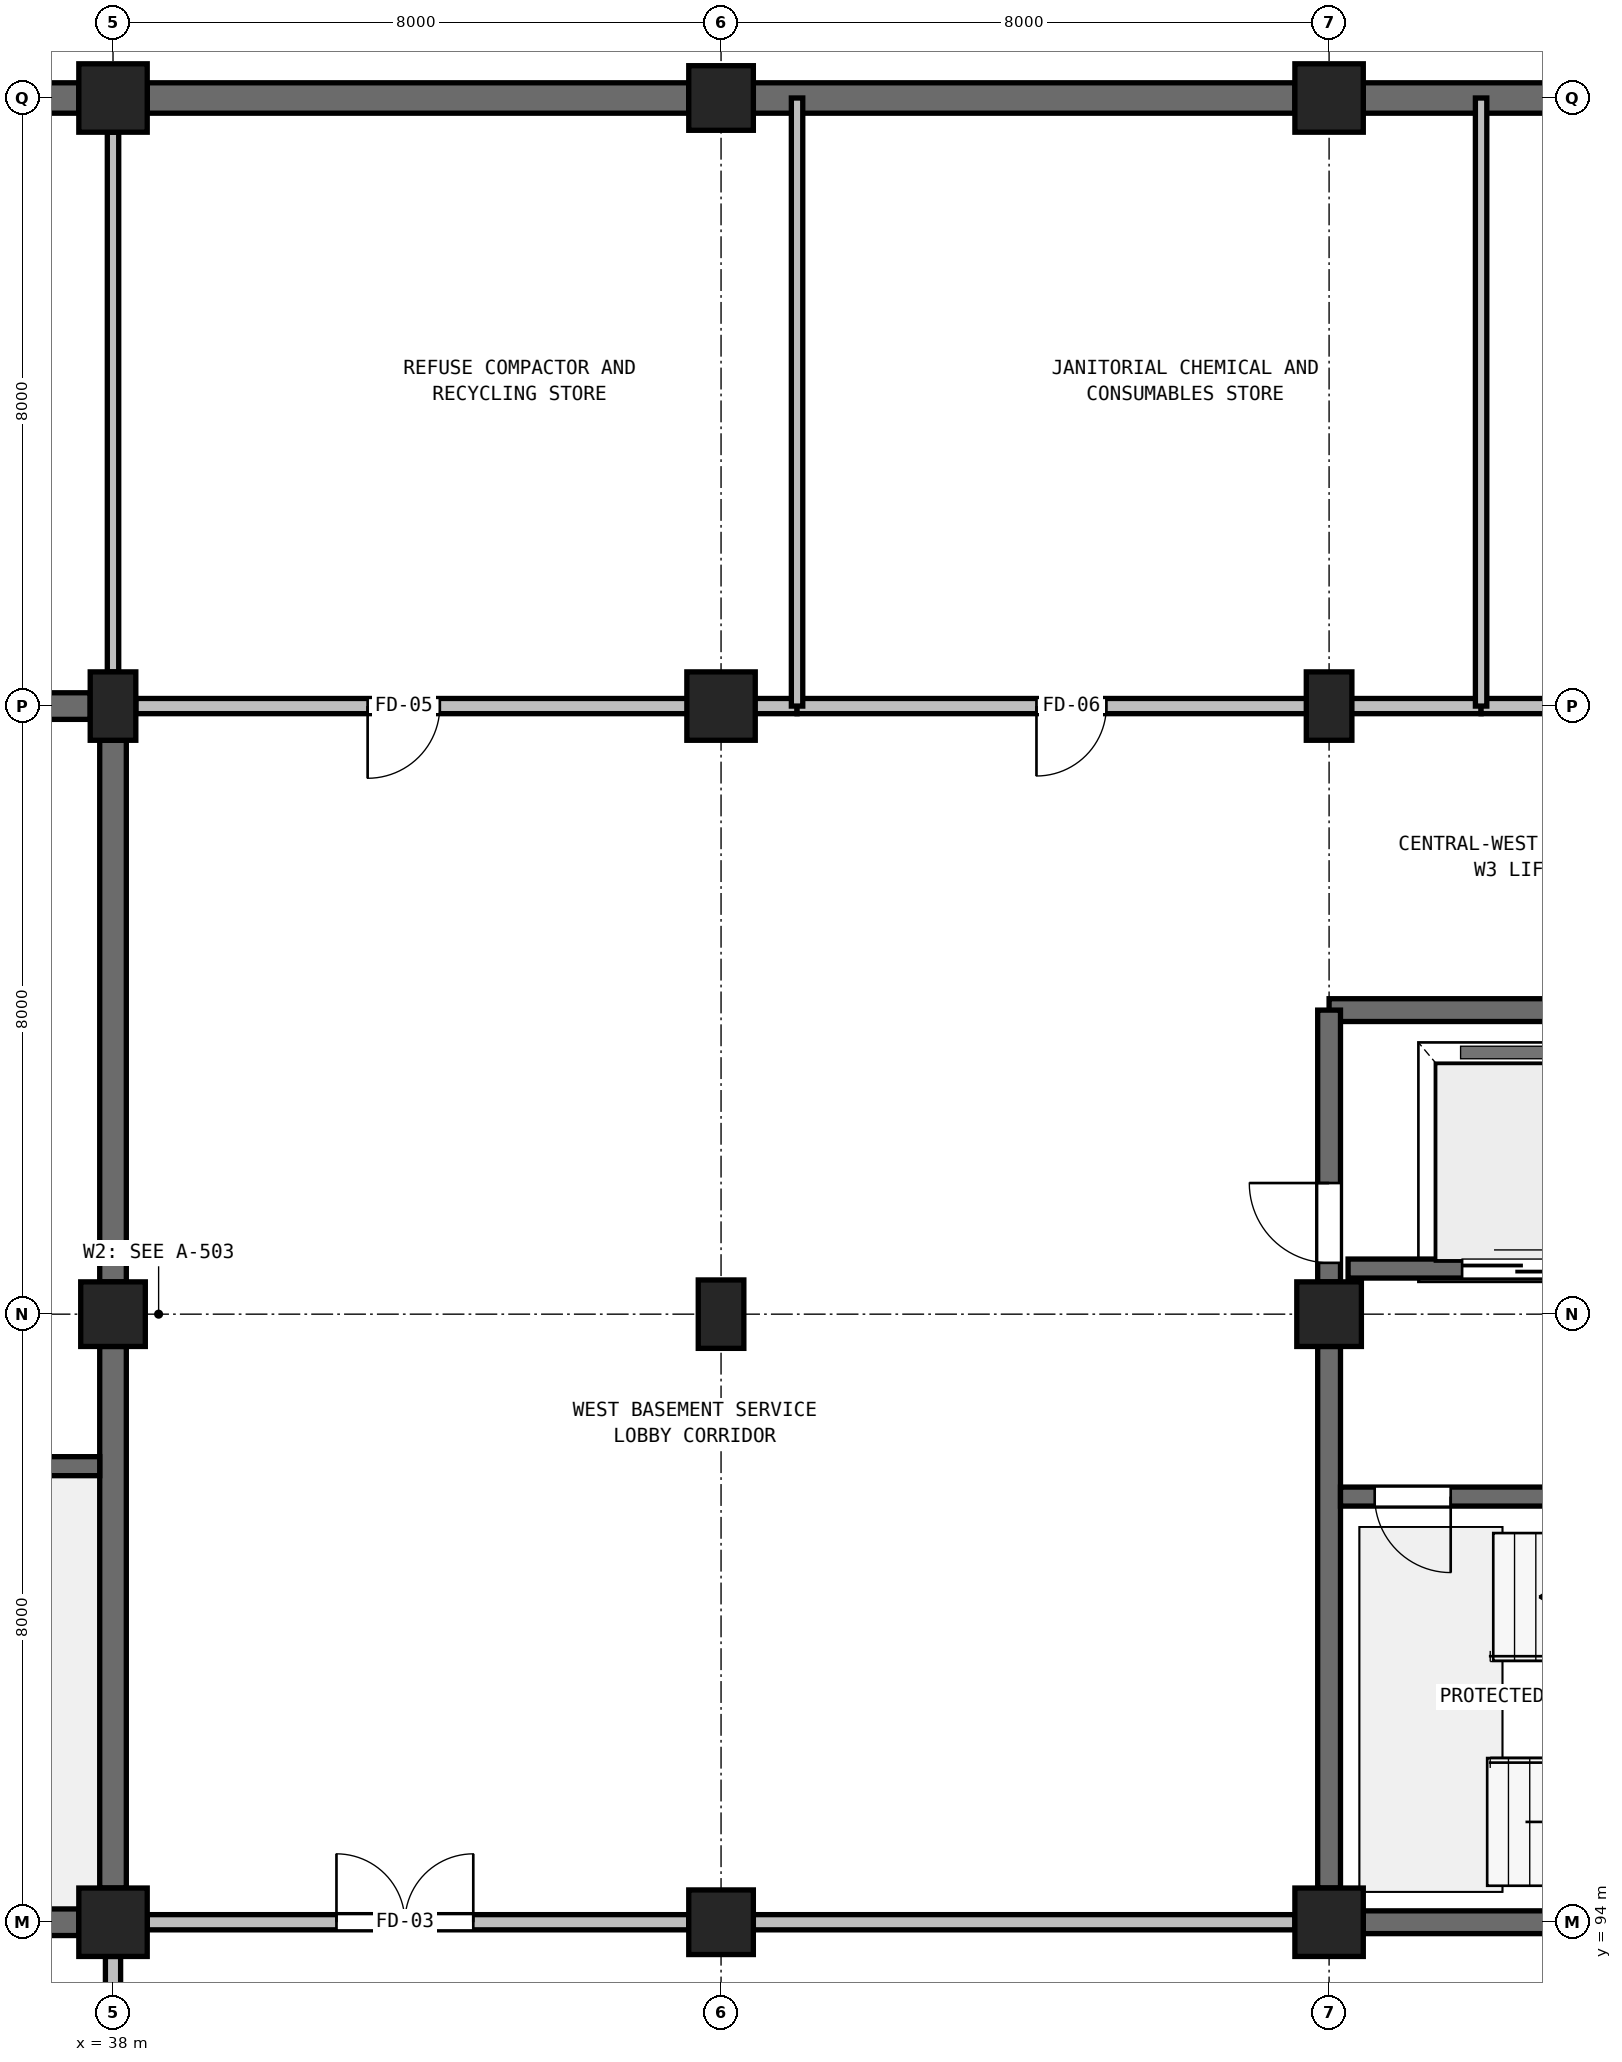
"""IFC4 building model, lengths in metres.
Left out: names, types, materials, properties, quantities, classifications, styles, units other than length and angle.
Written with IfcOpenShell. Run it as: python <this file> out.ifc"""

import sys

from ifc_helpers import new_model, si_unit, direction, frame, frame_2d, origin, origin_2d, place, context, subcontext, project, spatial, rectangle, extrude, element, fill, save


model = new_model("IFC4")
c1 = context("Model", 3, precision=1e-05, world=origin(), true_north=direction((0.0, 1.0)))
c2 = subcontext(c1, "Body", "Model", "MODEL_VIEW")
j1 = project(units=[si_unit("LENGTHUNIT", "METRE"), si_unit("PLANEANGLEUNIT", "RADIAN")], contexts=[c1])
p1 = place(None, origin())
s1 = spatial("IfcSite", under=j1, at=p1, CompositionType="ELEMENT")
p2 = place(p1, origin())
s2 = spatial("IfcBuilding", under=s1, at=p2, CompositionType="ELEMENT")
p3 = place(p2, frame((0.0, 0.0, -4.2)))
s3 = spatial("IfcBuildingStorey", under=s2, at=p3, CompositionType="ELEMENT", Elevation=-4.2)
p4 = place(p3, frame((38.0, 94.0, 0.0), z_axis=(0.0, 0.0, 1.0), x_axis=(1.0, 0.0, 0.0)))
e1 = element("IfcColumn", 1, at=p4, inside=s3, PredefinedType="COLUMN", context=c2, shape_type="SweptSolid", body=[
    extrude(rectangle(XDim=0.9, YDim=0.9, at=origin_2d()), origin(), (0.0, 0.0, 1.0), 4.2),
])
p5 = place(p3, frame((38.0, 102.0, 0.0), z_axis=(0.0, 0.0, 1.0), x_axis=(1.0, 0.0, 0.0)))
e2 = element("IfcColumn", 2, at=p5, inside=s3, PredefinedType="COLUMN", context=c2, shape_type="SweptSolid", body=[
    extrude(rectangle(XDim=0.85, YDim=0.85, at=origin_2d()), origin(), (0.0, 0.0, 1.0), 4.2),
])
p6 = place(p3, frame((38.0, 110.0, 0.0), z_axis=(0.0, 0.0, 1.0), x_axis=(1.0, 0.0, 0.0)))
e3 = element("IfcColumn", 3, at=p6, inside=s3, PredefinedType="COLUMN", context=c2, shape_type="SweptSolid", body=[
    extrude(rectangle(XDim=0.6, YDim=0.9, at=origin_2d()), origin(), (0.0, 0.0, 1.0), 4.2),
])
p7 = place(p3, frame((38.0, 118.0, 0.0), z_axis=(0.0, 0.0, 1.0), x_axis=(1.0, 0.0, 0.0)))
e4 = element("IfcColumn", 4, at=p7, inside=s3, PredefinedType="COLUMN", context=c2, shape_type="SweptSolid", body=[
    extrude(rectangle(XDim=0.9, YDim=0.9, at=origin_2d()), origin(), (0.0, 0.0, 1.0), 4.2),
])
p8 = place(p3, frame((46.0, 94.0, 0.0), z_axis=(0.0, 0.0, 1.0), x_axis=(1.0, 0.0, 0.0)))
e5 = element("IfcColumn", 5, at=p8, inside=s3, PredefinedType="COLUMN", context=c2, shape_type="SweptSolid", body=[
    extrude(rectangle(XDim=0.85, YDim=0.85, at=origin_2d()), origin(), (0.0, 0.0, 1.0), 4.2),
])
p9 = place(p3, frame((46.0, 102.0, 0.0), z_axis=(0.0, 0.0, 1.0), x_axis=(1.0, 0.0, 0.0)))
e6 = element("IfcColumn", 6, at=p9, inside=s3, PredefinedType="COLUMN", context=c2, shape_type="SweptSolid", body=[
    extrude(rectangle(XDim=0.6, YDim=0.9, at=origin_2d()), origin(), (0.0, 0.0, 1.0), 4.2),
])
p10 = place(p3, frame((46.0, 110.0, 0.0), z_axis=(0.0, 0.0, 1.0), x_axis=(1.0, 0.0, 0.0)))
e7 = element("IfcColumn", 7, at=p10, inside=s3, PredefinedType="COLUMN", context=c2, shape_type="SweptSolid", body=[
    extrude(rectangle(XDim=0.9, YDim=0.9, at=origin_2d()), origin(), (0.0, 0.0, 1.0), 4.2),
])
p11 = place(p3, frame((46.0, 118.0, 0.0), z_axis=(0.0, 0.0, 1.0), x_axis=(1.0, 0.0, 0.0)))
e8 = element("IfcColumn", 8, at=p11, inside=s3, PredefinedType="COLUMN", context=c2, shape_type="SweptSolid", body=[
    extrude(rectangle(XDim=0.85, YDim=0.85, at=origin_2d()), origin(), (0.0, 0.0, 1.0), 4.2),
])
p12 = place(p3, frame((54.0, 94.0, 0.0), z_axis=(0.0, 0.0, 1.0), x_axis=(1.0, 0.0, 0.0)))
e9 = element("IfcColumn", 9, at=p12, inside=s3, PredefinedType="COLUMN", context=c2, shape_type="SweptSolid", body=[
    extrude(rectangle(XDim=0.9, YDim=0.9, at=origin_2d()), origin(), (0.0, 0.0, 1.0), 4.2),
])
p13 = place(p3, frame((54.0, 102.0, 0.0), z_axis=(0.0, 0.0, 1.0), x_axis=(1.0, 0.0, 0.0)))
e10 = element("IfcColumn", 10, at=p13, inside=s3, PredefinedType="COLUMN", context=c2, shape_type="SweptSolid", body=[
    extrude(rectangle(XDim=0.85, YDim=0.85, at=origin_2d()), origin(), (0.0, 0.0, 1.0), 4.2),
])
p14 = place(p3, frame((54.0, 110.0, 0.0), z_axis=(0.0, 0.0, 1.0), x_axis=(1.0, 0.0, 0.0)))
e11 = element("IfcColumn", 11, at=p14, inside=s3, PredefinedType="COLUMN", context=c2, shape_type="SweptSolid", body=[
    extrude(rectangle(XDim=0.6, YDim=0.9, at=origin_2d()), origin(), (0.0, 0.0, 1.0), 4.2),
])
p15 = place(p3, frame((54.0, 118.0, 0.0), z_axis=(0.0, 0.0, 1.0), x_axis=(1.0, 0.0, 0.0)))
e12 = element("IfcColumn", 12, at=p15, inside=s3, PredefinedType="COLUMN", context=c2, shape_type="SweptSolid", body=[
    extrude(rectangle(XDim=0.9, YDim=0.9, at=origin_2d()), origin(), (0.0, 0.0, 1.0), 4.2),
])
p16 = place(p3, frame((30.3, 118.0, 0.0), z_axis=(0.0, 0.0, 1.0), x_axis=(1.0, 0.0, 0.0)))
e13 = element("IfcWall", 13, at=p16, inside=s3, PredefinedType="USERDEFINED", context=c2, shape_type="SweptSolid", body=[
    extrude(rectangle(XDim=7.25, YDim=0.4, at=frame_2d((3.625, 0.0))), origin(), (0.0, 0.0, 1.0), 3.92),
])
for number, where, z_axis, x_axis in (
    (14, (38.45, 118.0, 0.0), (0.0, 0.0, 1.0), (1.0, 0.0, 0.0)),
    (15, (46.425, 118.0, 0.0), (0.0, 0.0, 1.0), (1.0, 0.0, 0.0)),
):
    element("IfcWall", number, at=place(p3, frame(where, z_axis=z_axis, x_axis=x_axis)), inside=s3, PredefinedType="USERDEFINED", context=c2, shape_type="SweptSolid", body=[
        extrude(rectangle(XDim=7.125, YDim=0.4, at=frame_2d((3.562, 0.0))), origin(), (0.0, 0.0, 1.0), 3.92),
    ])
p17 = place(p3, frame((54.45, 118.0, 0.0), z_axis=(0.0, 0.0, 1.0), x_axis=(1.0, 0.0, 0.0)))
e16 = element("IfcWall", 16, at=p17, inside=s3, PredefinedType="USERDEFINED", context=c2, shape_type="SweptSolid", body=[
    extrude(rectangle(XDim=7.1, YDim=0.4, at=frame_2d((3.55, 0.0))), origin(), (0.0, 0.0, 1.0), 3.92),
])
p18 = place(p3, frame((30.3, 94.0, 0.0), z_axis=(0.0, 0.0, 1.0), x_axis=(1.0, 0.0, 0.0)))
e17 = element("IfcWall", 17, at=p18, inside=s3, PredefinedType="SHEAR", context=c2, shape_type="SweptSolid", body=[
    extrude(rectangle(XDim=7.25, YDim=0.35, at=frame_2d((3.625, 0.0))), origin(), (0.0, 0.0, 1.0), 3.98),
])
p19 = place(p3, frame((30.425, 110.0, 0.0), z_axis=(0.0, 0.0, 1.0), x_axis=(1.0, 0.0, 0.0)))
e18 = element("IfcWall", 18, at=p19, inside=s3, PredefinedType="SHEAR", context=c2, shape_type="SweptSolid", body=[
    extrude(rectangle(XDim=7.275, YDim=0.35, at=frame_2d((3.637, 0.0))), origin(), (0.0, 0.0, 1.0), 3.98),
])
for number, where, z_axis, x_axis in (
    (19, (38.0, 94.45, 0.0), (0.0, 0.0, 1.0), (0.0, 1.0, 0.0)),
    (20, (38.0, 102.425, 0.0), (0.0, 0.0, 1.0), (0.0, 1.0, 0.0)),
):
    element("IfcWall", number, at=place(p3, frame(where, z_axis=z_axis, x_axis=x_axis)), inside=s3, PredefinedType="SHEAR", context=c2, shape_type="SweptSolid", body=[
        extrude(rectangle(XDim=7.125, YDim=0.35, at=frame_2d((3.562, 0.0))), origin(), (0.0, 0.0, 1.0), 3.98),
    ])
p20 = place(p3, frame((30.175, 100.0, 0.0), z_axis=(0.0, 0.0, 1.0), x_axis=(1.0, 0.0, 0.0)))
e21 = element("IfcWall", 21, at=p20, inside=s3, PredefinedType="SOLIDWALL", context=c2, shape_type="SweptSolid", body=[
    extrude(rectangle(XDim=7.65, YDim=0.25, at=frame_2d((3.825, 0.0))), origin(), (0.0, 0.0, 1.0), 3.98),
])
p21 = place(p20, frame((0.425, 0.0, 0.0)))
e22 = element("IfcOpeningElement", 22, at=p21, cuts=e21, PredefinedType="OPENING", context=c2, shape_type="SweptSolid", body=[
    extrude(rectangle(XDim=1.0, YDim=2.2, at=frame_2d((0.5, 1.1))), frame((0.0, 0.135, 0.0), z_axis=(0.0, -1.0, 0.0), x_axis=(1.0, 0.0, 0.0)), (0.0, 0.0, 1.0), 0.27),
])
p22 = place(p3, frame((54.45, 94.0, 0.0), z_axis=(0.0, 0.0, 1.0), x_axis=(1.0, 0.0, 0.0)))
e23 = element("IfcWall", 23, at=p22, inside=s3, PredefinedType="SHEAR", context=c2, shape_type="SweptSolid", body=[
    extrude(rectangle(XDim=7.1, YDim=0.3, at=frame_2d((3.55, 0.0))), origin(), (0.0, 0.0, 1.0), 3.98),
])
p23 = place(p3, frame((54.0, 106.0, 0.0), z_axis=(0.0, 0.0, 1.0), x_axis=(1.0, 0.0, 0.0)))
e24 = element("IfcWall", 24, at=p23, inside=s3, PredefinedType="SHEAR", context=c2, shape_type="SweptSolid", body=[
    extrude(rectangle(XDim=8.0, YDim=0.3, at=frame_2d((4.0, 0.0))), origin(), (0.0, 0.0, 1.0), 3.98),
])
p24 = place(p3, frame((54.0, 94.45, 0.0), z_axis=(0.0, 0.0, 1.0), x_axis=(0.0, 1.0, 0.0)))
e25 = element("IfcWall", 25, at=p24, inside=s3, PredefinedType="SHEAR", context=c2, shape_type="SweptSolid", body=[
    extrude(rectangle(XDim=7.125, YDim=0.3, at=frame_2d((3.562, 0.0))), origin(), (0.0, 0.0, 1.0), 3.98),
])
p25 = place(p3, frame((54.0, 102.425, 0.0), z_axis=(0.0, 0.0, 1.0), x_axis=(0.0, 1.0, 0.0)))
e26 = element("IfcWall", 26, at=p25, inside=s3, PredefinedType="SHEAR", context=c2, shape_type="SweptSolid", body=[
    extrude(rectangle(XDim=3.575, YDim=0.3, at=frame_2d((1.788, 0.0))), origin(), (0.0, 0.0, 1.0), 3.98),
])
p26 = place(p25, frame((0.25, 0.0, 0.0)))
e27 = element("IfcOpeningElement", 27, at=p26, cuts=e26, PredefinedType="OPENING", context=c2, shape_type="SweptSolid", body=[
    extrude(rectangle(XDim=1.05, YDim=2.2, at=frame_2d((0.525, 1.1))), frame((0.0, 0.16, 0.0), z_axis=(0.0, -1.0, 0.0), x_axis=(1.0, 0.0, 0.0)), (0.0, 0.0, 1.0), 0.32),
])
p27 = place(p3, frame((54.15, 99.6, 0.0), z_axis=(0.0, 0.0, 1.0), x_axis=(1.0, 0.0, 0.0)))
e28 = element("IfcWall", 28, at=p27, inside=s3, PredefinedType="SOLIDWALL", context=c2, shape_type="SweptSolid", body=[
    extrude(rectangle(XDim=7.7, YDim=0.25, at=frame_2d((3.85, 0.0))), origin(), (0.0, 0.0, 1.0), 3.98),
])
p28 = place(p27, frame((0.45, 0.0, 0.0)))
e29 = element("IfcOpeningElement", 29, at=p28, cuts=e28, PredefinedType="OPENING", context=c2, shape_type="SweptSolid", body=[
    extrude(rectangle(XDim=1.0, YDim=2.2, at=frame_2d((0.5, 1.1))), frame((0.0, 0.135, 0.0), z_axis=(0.0, -1.0, 0.0), x_axis=(1.0, 0.0, 0.0)), (0.0, 0.0, 1.0), 0.27),
])
p29 = place(p3, frame((54.25, 102.6, 0.0), z_axis=(0.0, 0.0, 1.0), x_axis=(1.0, 0.0, 0.0)))
e30 = element("IfcWall", 30, at=p29, inside=s3, PredefinedType="SOLIDWALL", context=c2, shape_type="SweptSolid", body=[
    extrude(rectangle(XDim=4.3, YDim=0.25, at=frame_2d((2.15, 0.0))), origin(), (0.0, 0.0, 1.0), 3.98),
])
p30 = place(p29, frame((1.5, 0.0, 0.0)))
e31 = element("IfcOpeningElement", 31, at=p30, cuts=e30, PredefinedType="OPENING", context=c2, shape_type="SweptSolid", body=[
    extrude(rectangle(XDim=1.5, YDim=2.3, at=frame_2d((0.75, 1.15))), frame((0.0, 0.135, 0.0), z_axis=(0.0, -1.0, 0.0), x_axis=(1.0, 0.0, 0.0)), (0.0, 0.0, 1.0), 0.27),
])
p31 = place(p3, frame((38.45, 94.0, 0.0), z_axis=(0.0, 0.0, 1.0), x_axis=(1.0, 0.0, 0.0)))
e32 = element("IfcWall", 32, at=p31, inside=s3, PredefinedType="PARTITIONING", context=c2, shape_type="SweptSolid", body=[
    extrude(rectangle(XDim=7.125, YDim=0.2, at=frame_2d((3.562, 0.0))), origin(), (0.0, 0.0, 1.0), 2.92),
])
p32 = place(p31, frame((2.49, 0.0, 0.0)))
e33 = element("IfcOpeningElement", 33, at=p32, cuts=e32, PredefinedType="OPENING", context=c2, shape_type="SweptSolid", body=[
    extrude(rectangle(XDim=1.8, YDim=2.2, at=frame_2d((0.9, 1.1))), frame((0.0, 0.11, 0.0), z_axis=(0.0, -1.0, 0.0), x_axis=(1.0, 0.0, 0.0)), (0.0, 0.0, 1.0), 0.22),
])
p33 = place(p3, frame((46.425, 94.0, 0.0), z_axis=(0.0, 0.0, 1.0), x_axis=(1.0, 0.0, 0.0)))
e34 = element("IfcWall", 34, at=p33, inside=s3, PredefinedType="PARTITIONING", context=c2, shape_type="SweptSolid", body=[
    extrude(rectangle(XDim=7.125, YDim=0.2, at=frame_2d((3.562, 0.0))), origin(), (0.0, 0.0, 1.0), 2.82),
])
p34 = place(p3, frame((38.0, 86.45, 0.0), z_axis=(0.0, 0.0, 1.0), x_axis=(0.0, 1.0, 0.0)))
e35 = element("IfcWall", 35, at=p34, inside=s3, PredefinedType="PARTITIONING", context=c2, shape_type="SweptSolid", body=[
    extrude(rectangle(XDim=7.1, YDim=0.2, at=frame_2d((3.55, 0.0))), origin(), (0.0, 0.0, 1.0), 3.27),
])
p35 = place(p3, frame((38.3, 110.0, 0.0), z_axis=(0.0, 0.0, 1.0), x_axis=(1.0, 0.0, 0.0)))
e36 = element("IfcWall", 36, at=p35, inside=s3, PredefinedType="PARTITIONING", context=c2, shape_type="SweptSolid", body=[
    extrude(rectangle(XDim=8.7, YDim=0.2, at=frame_2d((4.35, 0.0))), origin(), (0.0, 0.0, 1.0), 3.02),
])
p36 = place(p35, frame((3.05, 0.0, 0.0)))
e37 = element("IfcOpeningElement", 37, at=p36, cuts=e36, PredefinedType="OPENING", context=c2, shape_type="SweptSolid", body=[
    extrude(rectangle(XDim=0.95, YDim=2.15, at=frame_2d((0.475, 1.075))), frame((0.0, 0.11, 0.0), z_axis=(0.0, -1.0, 0.0), x_axis=(1.0, 0.0, 0.0)), (0.0, 0.0, 1.0), 0.22),
])
p37 = place(p3, frame((47.0, 110.0, 0.0), z_axis=(0.0, 0.0, 1.0), x_axis=(1.0, 0.0, 0.0)))
e38 = element("IfcWall", 38, at=p37, inside=s3, PredefinedType="PARTITIONING", context=c2, shape_type="SweptSolid", body=[
    extrude(rectangle(XDim=9.0, YDim=0.2, at=frame_2d((4.5, 0.0))), origin(), (0.0, 0.0, 1.0), 3.02),
])
p38 = place(p37, frame((3.15, 0.0, 0.0)))
e39 = element("IfcOpeningElement", 39, at=p38, cuts=e38, PredefinedType="OPENING", context=c2, shape_type="SweptSolid", body=[
    extrude(rectangle(XDim=0.92, YDim=2.15, at=frame_2d((0.46, 1.075))), frame((0.0, 0.11, 0.0), z_axis=(0.0, -1.0, 0.0), x_axis=(1.0, 0.0, 0.0)), (0.0, 0.0, 1.0), 0.22),
])
p39 = place(p3, frame((56.0, 110.0, 0.0), z_axis=(0.0, 0.0, 1.0), x_axis=(1.0, 0.0, 0.0)))
e40 = element("IfcWall", 40, at=p39, inside=s3, PredefinedType="PARTITIONING", context=c2, shape_type="SweptSolid", body=[
    extrude(rectangle(XDim=10.0, YDim=0.2, at=frame_2d((5.0, 0.0))), origin(), (0.0, 0.0, 1.0), 3.32),
])
p40 = place(p3, frame((38.0, 110.45, 0.0), z_axis=(0.0, 0.0, 1.0), x_axis=(0.0, 1.0, 0.0)))
e41 = element("IfcWall", 41, at=p40, inside=s3, PredefinedType="PARTITIONING", context=c2, shape_type="SweptSolid", body=[
    extrude(rectangle(XDim=7.1, YDim=0.15, at=frame_2d((3.55, 0.0))), origin(), (0.0, 0.0, 1.0), 3.12),
])
for number, where, z_axis, x_axis in (
    (42, (47.0, 110.0, 0.0), (0.0, 0.0, 1.0), (0.0, 1.0, 0.0)),
    (43, (56.0, 110.0, 0.0), (0.0, 0.0, 1.0), (0.0, 1.0, 0.0)),
):
    element("IfcWall", number, at=place(p3, frame(where, z_axis=z_axis, x_axis=x_axis)), inside=s3, PredefinedType="PARTITIONING", context=c2, shape_type="SweptSolid", body=[
        extrude(rectangle(XDim=8.0, YDim=0.15, at=frame_2d((4.0, 0.0))), origin(), (0.0, 0.0, 1.0), 3.9),
    ])
p41 = place(p26, origin())
e44 = element("IfcDoor", 44, at=p41, inside=s3, OperationType="SINGLE_SWING_RIGHT", PredefinedType="DOOR", context=c2, shape_type="SweptSolid", body=[
    extrude(rectangle(XDim=1.05, YDim=2.2, at=frame_2d((0.525, 1.1))), frame((0.0, 0.025, 0.0), z_axis=(0.0, -1.0, 0.0), x_axis=(1.0, 0.0, 0.0)), (0.0, 0.0, 1.0), 0.05),
])
fill(e27, e44)
p42 = place(p28, frame((1.0, 0.0, 0.0), z_axis=(0.0, 0.0, 1.0), x_axis=(-1.0, 0.0, 0.0)))
e45 = element("IfcDoor", 45, at=p42, inside=s3, OperationType="SINGLE_SWING_RIGHT", PredefinedType="DOOR", context=c2, shape_type="SweptSolid", body=[
    extrude(rectangle(XDim=1.0, YDim=2.2, at=frame_2d((0.5, 1.1))), frame((0.0, 0.025, 0.0), z_axis=(0.0, -1.0, 0.0), x_axis=(1.0, 0.0, 0.0)), (0.0, 0.0, 1.0), 0.05),
])
fill(e29, e45)
p43 = place(p30, origin())
e46 = element("IfcDoor", 46, at=p43, inside=s3, OperationType="DOUBLE_DOOR_SLIDING", PredefinedType="DOOR", context=c2, shape_type="SweptSolid", body=[
    extrude(rectangle(XDim=1.5, YDim=2.3, at=frame_2d((0.75, 1.15))), frame((0.0, 0.025, 0.0), z_axis=(0.0, -1.0, 0.0), x_axis=(1.0, 0.0, 0.0)), (0.0, 0.0, 1.0), 0.05),
])
fill(e31, e46)
p44 = place(p32, origin())
e47 = element("IfcDoor", 47, at=p44, inside=s3, OperationType="DOUBLE_DOOR_SINGLE_SWING", PredefinedType="DOOR", context=c2, shape_type="SweptSolid", body=[
    extrude(rectangle(XDim=1.8, YDim=2.2, at=frame_2d((0.9, 1.1))), frame((0.0, 0.025, 0.0), z_axis=(0.0, -1.0, 0.0), x_axis=(1.0, 0.0, 0.0)), (0.0, 0.0, 1.0), 0.05),
])
fill(e33, e47)
p45 = place(p36, frame((0.95, 0.0, 0.0), z_axis=(0.0, 0.0, 1.0), x_axis=(-1.0, 0.0, 0.0)))
e48 = element("IfcDoor", 48, at=p45, inside=s3, OperationType="SINGLE_SWING_LEFT", PredefinedType="DOOR", context=c2, shape_type="SweptSolid", body=[
    extrude(rectangle(XDim=0.95, YDim=2.15, at=frame_2d((0.475, 1.075))), frame((0.0, 0.025, 0.0), z_axis=(0.0, -1.0, 0.0), x_axis=(1.0, 0.0, 0.0)), (0.0, 0.0, 1.0), 0.05),
])
fill(e37, e48)
p46 = place(p38, frame((0.92, 0.0, 0.0), z_axis=(0.0, 0.0, 1.0), x_axis=(-1.0, 0.0, 0.0)))
e49 = element("IfcDoor", 49, at=p46, inside=s3, OperationType="SINGLE_SWING_LEFT", PredefinedType="DOOR", context=c2, shape_type="SweptSolid", body=[
    extrude(rectangle(XDim=0.92, YDim=2.15, at=frame_2d((0.46, 1.075))), frame((0.0, 0.025, 0.0), z_axis=(0.0, -1.0, 0.0), x_axis=(1.0, 0.0, 0.0)), (0.0, 0.0, 1.0), 0.05),
])
fill(e39, e49)
save(model, sys.argv[1])
